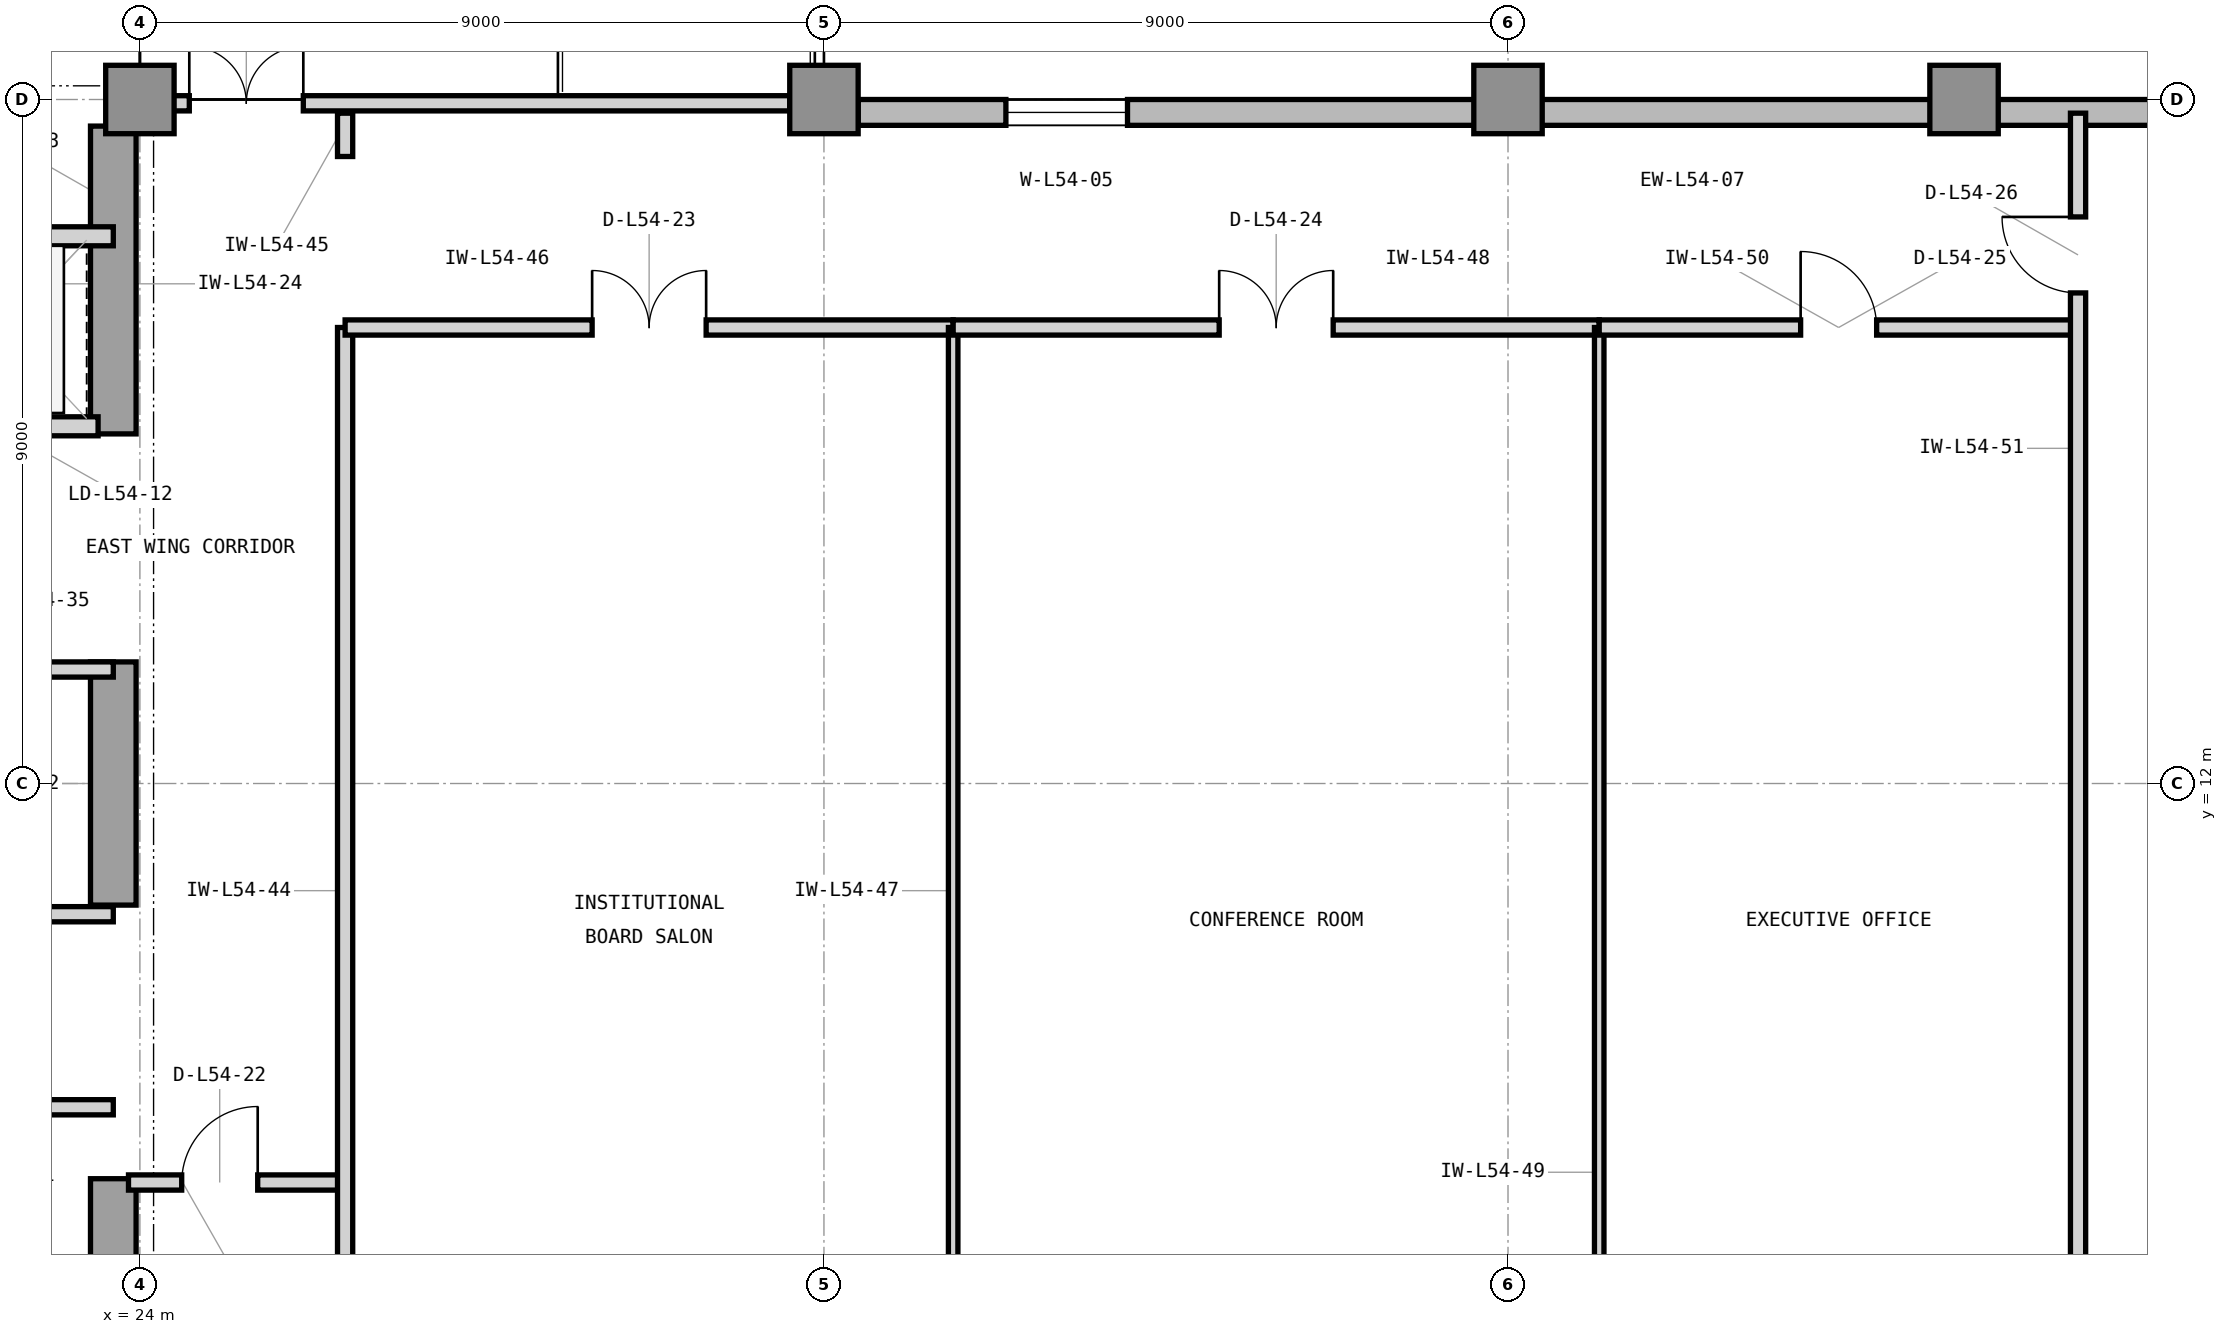
"""IFC4 building model, lengths in metres.
Left out: names, types, materials, properties, quantities, classifications, styles, units other than length and angle.
Written with IfcOpenShell. Run it as: python <this file> out.ifc"""

import sys

from ifc_helpers import new_model, si_unit, direction, frame, frame_2d, origin, origin_2d, place, context, subcontext, project, spatial, rectangle, extrude, element, fill, save


model = new_model("IFC4")
c1 = context("Model", 3, precision=1e-05, world=origin(), true_north=direction((0.0, 1.0)))
c2 = subcontext(c1, "Body", "Model", "MODEL_VIEW")
j1 = project(units=[si_unit("LENGTHUNIT", "METRE"), si_unit("PLANEANGLEUNIT", "RADIAN")], contexts=[c1])
p1 = place(None, origin())
s1 = spatial("IfcSite", under=j1, at=p1, CompositionType="ELEMENT")
p2 = place(p1, origin())
s2 = spatial("IfcBuilding", under=s1, at=p2, CompositionType="ELEMENT")
p3 = place(p2, frame((0.0, 0.0, 222.9)))
s3 = spatial("IfcBuildingStorey", under=s2, at=p3, CompositionType="ELEMENT", Elevation=222.9)
p4 = place(p3, frame((23.65, 3.65, 0.0), z_axis=(0.0, 0.0, 1.0), x_axis=(0.0, 1.0, 0.0)))
e1 = element("IfcWall", 1, at=p4, inside=s3, PredefinedType="SHEAR", context=c2, shape_type="SweptSolid", body=[
    extrude(rectangle(XDim=3.15, YDim=0.6, at=frame_2d((1.575, 0.0))), origin(), (0.0, 0.0, 1.0), 3.9),
])
p5 = place(p3, frame((23.65, 10.4, 0.0), z_axis=(0.0, 0.0, 1.0), x_axis=(0.0, 1.0, 0.0)))
e2 = element("IfcWall", 2, at=p5, inside=s3, PredefinedType="SHEAR", context=c2, shape_type="SweptSolid", body=[
    extrude(rectangle(XDim=3.2, YDim=0.6, at=frame_2d((1.6, 0.0))), origin(), (0.0, 0.0, 1.0), 3.9),
])
p6 = place(p3, frame((23.65, 16.6, 0.0), z_axis=(0.0, 0.0, 1.0), x_axis=(0.0, 1.0, 0.0)))
e3 = element("IfcWall", 3, at=p6, inside=s3, PredefinedType="SHEAR", context=c2, shape_type="SweptSolid", body=[
    extrude(rectangle(XDim=4.05, YDim=0.6, at=frame_2d((2.025, 0.0))), origin(), (0.0, 0.0, 1.0), 3.9),
])
for number, where, z_axis, x_axis in (
    (4, (24.0, 21.0, 0.0), (0.0, 0.0, 1.0), (1.0, 0.0, 0.0)),
    (5, (33.0, 21.0, 0.0), (0.0, 0.0, 1.0), (1.0, 0.0, 0.0)),
    (6, (42.0, 21.0, 0.0), (0.0, 0.0, 1.0), (1.0, 0.0, 0.0)),
    (7, (48.0, 21.0, 0.0), (0.0, 0.0, 1.0), (1.0, 0.0, 0.0)),
):
    element("IfcColumn", number, at=place(p3, frame(where, z_axis=z_axis, x_axis=x_axis)), inside=s3, PredefinedType="COLUMN", context=c2, shape_type="SweptSolid", body=[
        extrude(rectangle(XDim=0.9, YDim=0.9, at=origin_2d()), origin(), (0.0, 0.0, 1.0), 3.9),
    ])
p7 = place(p3, frame((55.4, 20.83, 0.0), z_axis=(0.0, 0.0, 1.0), x_axis=(-1.0, 0.0, 0.0)))
e8 = element("IfcWall", 8, at=p7, inside=s3, PredefinedType="STANDARD", context=c2, shape_type="SweptSolid", body=[
    extrude(rectangle(XDim=21.95, YDim=0.34, at=frame_2d((10.975, 0.0))), origin(), (0.0, 0.0, 1.0), 3.62),
])
p8 = place(p7, frame((18.406, 0.0, 0.9)))
e9 = element("IfcOpeningElement", 9, at=p8, cuts=e8, PredefinedType="OPENING", context=c2, shape_type="SweptSolid", body=[
    extrude(rectangle(XDim=1.6, YDim=2.2, at=frame_2d((0.8, 1.1))), frame((0.0, 0.18, 0.0), z_axis=(0.0, -1.0, 0.0), x_axis=(1.0, 0.0, 0.0)), (0.0, 0.0, 1.0), 0.36),
])
p9 = place(p3, frame((21.05, 16.7, 0.0), z_axis=(0.0, 0.0, 1.0), x_axis=(1.0, 0.0, 0.0)))
e10 = element("IfcWall", 10, at=p9, inside=s3, PredefinedType="PARTITIONING", context=c2, shape_type="SweptSolid", body=[
    extrude(rectangle(XDim=2.4, YDim=0.25, at=frame_2d((1.2, 0.0))), origin(), (0.0, 0.0, 1.0), 3.073),
])
p10 = place(p9, frame((0.52, 0.0, 0.0)))
e11 = element("IfcOpeningElement", 11, at=p10, cuts=e10, PredefinedType="OPENING", context=c2, shape_type="SweptSolid", body=[
    extrude(rectangle(XDim=1.15, YDim=2.25, at=frame_2d((0.575, 1.125))), frame((0.0, 0.135, 0.0), z_axis=(0.0, -1.0, 0.0), x_axis=(1.0, 0.0, 0.0)), (0.0, 0.0, 1.0), 0.27),
])
p11 = place(p3, frame((16.45, 19.2, 0.0), z_axis=(0.0, 0.0, 1.0), x_axis=(1.0, 0.0, 0.0)))
e12 = element("IfcWall", 12, at=p11, inside=s3, PredefinedType="PARTITIONING", context=c2, shape_type="SweptSolid", body=[
    extrude(rectangle(XDim=7.2, YDim=0.25, at=frame_2d((3.6, 0.0))), origin(), (0.0, 0.0, 1.0), 3.61),
])
p12 = place(p3, frame((20.65, 7.74, 0.0), z_axis=(0.0, 0.0, 1.0), x_axis=(1.0, 0.0, 0.0)))
e13 = element("IfcWall", 13, at=p12, inside=s3, PredefinedType="PARTITIONING", context=c2, shape_type="SweptSolid", body=[
    extrude(rectangle(XDim=3.0, YDim=0.2, at=frame_2d((1.5, 0.0))), origin(), (0.0, 0.0, 1.0), 3.61),
])
p13 = place(p12, frame((1.025, 0.0, 0.0)))
e14 = element("IfcOpeningElement", 14, at=p13, cuts=e13, PredefinedType="OPENING", context=c2, shape_type="SweptSolid", body=[
    extrude(rectangle(XDim=0.95, YDim=2.1, at=frame_2d((0.475, 1.05))), frame((0.0, 0.11, 0.0), z_axis=(0.0, -1.0, 0.0), x_axis=(1.0, 0.0, 0.0)), (0.0, 0.0, 1.0), 0.22),
])
p14 = place(p3, frame((14.825, 10.28, 0.0), z_axis=(0.0, 0.0, 1.0), x_axis=(1.0, 0.0, 0.0)))
e15 = element("IfcWall", 15, at=p14, inside=s3, PredefinedType="PARTITIONING", context=c2, shape_type="SweptSolid", body=[
    extrude(rectangle(XDim=8.825, YDim=0.2, at=frame_2d((4.413, 0.0))), origin(), (0.0, 0.0, 1.0), 3.61),
])
p15 = place(p3, frame((18.45, 13.5, 0.0), z_axis=(0.0, 0.0, 1.0), x_axis=(1.0, 0.0, 0.0)))
e16 = element("IfcWall", 16, at=p15, inside=s3, PredefinedType="PARTITIONING", context=c2, shape_type="SweptSolid", body=[
    extrude(rectangle(XDim=5.2, YDim=0.2, at=frame_2d((2.6, 0.0))), origin(), (0.0, 0.0, 1.0), 3.073),
])
p16 = place(p15, frame((2.125, 0.0, 0.0)))
e17 = element("IfcOpeningElement", 17, at=p16, cuts=e16, PredefinedType="OPENING", context=c2, shape_type="SweptSolid", body=[
    extrude(rectangle(XDim=0.95, YDim=2.1, at=frame_2d((0.475, 1.05))), frame((0.0, 0.11, 0.0), z_axis=(0.0, -1.0, 0.0), x_axis=(1.0, 0.0, 0.0)), (0.0, 0.0, 1.0), 0.22),
])
p17 = place(p3, frame((24.05, 20.95, 0.0), z_axis=(0.0, 0.0, 1.0), x_axis=(1.0, 0.0, 0.0)))
e18 = element("IfcWall", 18, at=p17, inside=s3, PredefinedType="PARTITIONING", context=c2, shape_type="SweptSolid", body=[
    extrude(rectangle(XDim=8.5, YDim=0.2, at=frame_2d((4.25, 0.0))), origin(), (0.0, 0.0, 1.0), 2.993),
])
p18 = place(p17, frame((0.6, 0.0, 0.0)))
e19 = element("IfcOpeningElement", 19, at=p18, cuts=e18, PredefinedType="OPENING", context=c2, shape_type="SweptSolid", body=[
    extrude(rectangle(XDim=1.5, YDim=2.3, at=frame_2d((0.75, 1.15))), frame((0.0, 0.11, 0.0), z_axis=(0.0, -1.0, 0.0), x_axis=(1.0, 0.0, 0.0)), (0.0, 0.0, 1.0), 0.22),
])
p19 = place(p3, frame((23.85, 6.75, 0.0), z_axis=(0.0, 0.0, 1.0), x_axis=(1.0, 0.0, 0.0)))
e20 = element("IfcWall", 20, at=p19, inside=s3, PredefinedType="PARTITIONING", context=c2, shape_type="SweptSolid", body=[
    extrude(rectangle(XDim=2.85, YDim=0.2, at=frame_2d((1.425, 0.0))), origin(), (0.0, 0.0, 1.0), 3.61),
])
p20 = place(p19, frame((0.7, 0.0, 0.0)))
e21 = element("IfcOpeningElement", 21, at=p20, cuts=e20, PredefinedType="OPENING", context=c2, shape_type="SweptSolid", body=[
    extrude(rectangle(XDim=1.0, YDim=2.15, at=frame_2d((0.5, 1.075))), frame((0.0, 0.11, 0.0), z_axis=(0.0, -1.0, 0.0), x_axis=(1.0, 0.0, 0.0)), (0.0, 0.0, 1.0), 0.22),
])
p21 = place(p3, frame((26.7, 3.18, 0.0), z_axis=(0.0, 0.0, 1.0), x_axis=(0.0, 1.0, 0.0)))
e22 = element("IfcWall", 22, at=p21, inside=s3, PredefinedType="PARTITIONING", context=c2, shape_type="SweptSolid", body=[
    extrude(rectangle(XDim=14.82, YDim=0.2, at=frame_2d((7.41, 0.0))), origin(), (0.0, 0.0, 1.0), 3.61),
])
p22 = place(p3, frame((26.7, 20.25, 0.0), z_axis=(0.0, 0.0, 1.0), x_axis=(0.0, 1.0, 0.0)))
e23 = element("IfcWall", 23, at=p22, inside=s3, PredefinedType="PARTITIONING", context=c2, shape_type="SweptSolid", body=[
    extrude(rectangle(XDim=0.57, YDim=0.2, at=frame_2d((0.285, 0.0))), origin(), (0.0, 0.0, 1.0), 3.61),
])
p23 = place(p3, frame((26.7, 18.0, 0.0), z_axis=(0.0, 0.0, 1.0), x_axis=(1.0, 0.0, 0.0)))
e24 = element("IfcWall", 24, at=p23, inside=s3, PredefinedType="PARTITIONING", context=c2, shape_type="SweptSolid", body=[
    extrude(rectangle(XDim=8.0, YDim=0.2, at=frame_2d((4.0, 0.0))), origin(), (0.0, 0.0, 1.0), 3.073),
])
p24 = place(p23, frame((3.25, 0.0, 0.0)))
e25 = element("IfcOpeningElement", 25, at=p24, cuts=e24, PredefinedType="OPENING", context=c2, shape_type="SweptSolid", body=[
    extrude(rectangle(XDim=1.5, YDim=2.3, at=frame_2d((0.75, 1.15))), frame((0.0, 0.11, 0.0), z_axis=(0.0, -1.0, 0.0), x_axis=(1.0, 0.0, 0.0)), (0.0, 0.0, 1.0), 0.22),
])
p25 = place(p3, frame((34.7, 3.18, 0.0), z_axis=(0.0, 0.0, 1.0), x_axis=(0.0, 1.0, 0.0)))
e26 = element("IfcWall", 26, at=p25, inside=s3, PredefinedType="PARTITIONING", context=c2, shape_type="SweptSolid", body=[
    extrude(rectangle(XDim=14.82, YDim=0.125, at=frame_2d((7.41, 0.0))), origin(), (0.0, 0.0, 1.0), 3.61),
])
p26 = place(p3, frame((34.7, 18.0, 0.0), z_axis=(0.0, 0.0, 1.0), x_axis=(1.0, 0.0, 0.0)))
e27 = element("IfcWall", 27, at=p26, inside=s3, PredefinedType="PARTITIONING", context=c2, shape_type="SweptSolid", body=[
    extrude(rectangle(XDim=8.5, YDim=0.2, at=frame_2d((4.25, 0.0))), origin(), (0.0, 0.0, 1.0), 3.073),
])
p27 = place(p26, frame((3.5, 0.0, 0.0)))
e28 = element("IfcOpeningElement", 28, at=p27, cuts=e27, PredefinedType="OPENING", context=c2, shape_type="SweptSolid", body=[
    extrude(rectangle(XDim=1.5, YDim=2.3, at=frame_2d((0.75, 1.15))), frame((0.0, 0.11, 0.0), z_axis=(0.0, -1.0, 0.0), x_axis=(1.0, 0.0, 0.0)), (0.0, 0.0, 1.0), 0.22),
])
p28 = place(p3, frame((43.2, 3.18, 0.0), z_axis=(0.0, 0.0, 1.0), x_axis=(0.0, 1.0, 0.0)))
e29 = element("IfcWall", 29, at=p28, inside=s3, PredefinedType="PARTITIONING", context=c2, shape_type="SweptSolid", body=[
    extrude(rectangle(XDim=14.82, YDim=0.125, at=frame_2d((7.41, 0.0))), origin(), (0.0, 0.0, 1.0), 3.61),
])
p29 = place(p3, frame((43.2, 18.0, 0.0), z_axis=(0.0, 0.0, 1.0), x_axis=(1.0, 0.0, 0.0)))
e30 = element("IfcWall", 30, at=p29, inside=s3, PredefinedType="PARTITIONING", context=c2, shape_type="SweptSolid", body=[
    extrude(rectangle(XDim=6.3, YDim=0.2, at=frame_2d((3.15, 0.0))), origin(), (0.0, 0.0, 1.0), 3.073),
])
p30 = place(p29, frame((2.65, 0.0, 0.0)))
e31 = element("IfcOpeningElement", 31, at=p30, cuts=e30, PredefinedType="OPENING", context=c2, shape_type="SweptSolid", body=[
    extrude(rectangle(XDim=1.0, YDim=2.15, at=frame_2d((0.5, 1.075))), frame((0.0, 0.11, 0.0), z_axis=(0.0, -1.0, 0.0), x_axis=(1.0, 0.0, 0.0)), (0.0, 0.0, 1.0), 0.22),
])
p31 = place(p3, frame((49.5, 3.18, 0.0), z_axis=(0.0, 0.0, 1.0), x_axis=(0.0, 1.0, 0.0)))
e32 = element("IfcWall", 32, at=p31, inside=s3, PredefinedType="PARTITIONING", context=c2, shape_type="SweptSolid", body=[
    extrude(rectangle(XDim=17.64, YDim=0.2, at=frame_2d((8.82, 0.0))), origin(), (0.0, 0.0, 1.0), 3.61),
])
p32 = place(p31, frame((15.275, 0.0, 0.0)))
e33 = element("IfcOpeningElement", 33, at=p32, cuts=e32, PredefinedType="OPENING", context=c2, shape_type="SweptSolid", body=[
    extrude(rectangle(XDim=1.0, YDim=2.15, at=frame_2d((0.5, 1.075))), frame((0.0, 0.11, 0.0), z_axis=(0.0, -1.0, 0.0), x_axis=(1.0, 0.0, 0.0)), (0.0, 0.0, 1.0), 0.22),
])
p33 = place(p8, origin())
e34 = element("IfcWindow", 34, at=p33, inside=s3, PartitioningType="SINGLE_PANEL", PredefinedType="WINDOW", context=c2, shape_type="SweptSolid", body=[
    extrude(rectangle(XDim=1.6, YDim=2.2, at=frame_2d((0.8, 1.1))), frame((0.0, 0.11, 0.0), z_axis=(0.0, -1.0, 0.0), x_axis=(1.0, 0.0, 0.0)), (0.0, 0.0, 1.0), 0.06),
])
fill(e9, e34)
p34 = place(p18, origin())
e35 = element("IfcDoor", 35, at=p34, inside=s3, OperationType="DOUBLE_DOOR_SINGLE_SWING", PredefinedType="DOOR", context=c2, shape_type="SweptSolid", body=[
    extrude(rectangle(XDim=1.5, YDim=2.3, at=frame_2d((0.75, 1.15))), frame((0.0, 0.025, 0.0), z_axis=(0.0, -1.0, 0.0), x_axis=(1.0, 0.0, 0.0)), (0.0, 0.0, 1.0), 0.05),
])
fill(e19, e35)
p35 = place(p20, origin())
e36 = element("IfcDoor", 36, at=p35, inside=s3, OperationType="SINGLE_SWING_RIGHT", PredefinedType="DOOR", context=c2, shape_type="SweptSolid", body=[
    extrude(rectangle(XDim=1.0, YDim=2.15, at=frame_2d((0.5, 1.075))), frame((0.0, 0.025, 0.0), z_axis=(0.0, -1.0, 0.0), x_axis=(1.0, 0.0, 0.0)), (0.0, 0.0, 1.0), 0.05),
])
fill(e21, e36)
p36 = place(p24, origin())
e37 = element("IfcDoor", 37, at=p36, inside=s3, OperationType="DOUBLE_DOOR_SINGLE_SWING", PredefinedType="DOOR", context=c2, shape_type="SweptSolid", body=[
    extrude(rectangle(XDim=1.5, YDim=2.3, at=frame_2d((0.75, 1.15))), frame((0.0, 0.025, 0.0), z_axis=(0.0, -1.0, 0.0), x_axis=(1.0, 0.0, 0.0)), (0.0, 0.0, 1.0), 0.05),
])
fill(e25, e37)
p37 = place(p27, origin())
e38 = element("IfcDoor", 38, at=p37, inside=s3, OperationType="DOUBLE_DOOR_SINGLE_SWING", PredefinedType="DOOR", context=c2, shape_type="SweptSolid", body=[
    extrude(rectangle(XDim=1.5, YDim=2.3, at=frame_2d((0.75, 1.15))), frame((0.0, 0.025, 0.0), z_axis=(0.0, -1.0, 0.0), x_axis=(1.0, 0.0, 0.0)), (0.0, 0.0, 1.0), 0.05),
])
fill(e28, e38)
p38 = place(p30, origin())
e39 = element("IfcDoor", 39, at=p38, inside=s3, OperationType="SINGLE_SWING_LEFT", PredefinedType="DOOR", context=c2, shape_type="SweptSolid", body=[
    extrude(rectangle(XDim=1.0, YDim=2.15, at=frame_2d((0.5, 1.075))), frame((0.0, 0.025, 0.0), z_axis=(0.0, -1.0, 0.0), x_axis=(1.0, 0.0, 0.0)), (0.0, 0.0, 1.0), 0.05),
])
fill(e31, e39)
p39 = place(p32, origin())
e40 = element("IfcDoor", 40, at=p39, inside=s3, OperationType="SINGLE_SWING_RIGHT", PredefinedType="DOOR", context=c2, shape_type="SweptSolid", body=[
    extrude(rectangle(XDim=1.0, YDim=2.15, at=frame_2d((0.5, 1.075))), frame((0.0, 0.025, 0.0), z_axis=(0.0, -1.0, 0.0), x_axis=(1.0, 0.0, 0.0)), (0.0, 0.0, 1.0), 0.05),
])
fill(e33, e40)
save(model, sys.argv[1])
